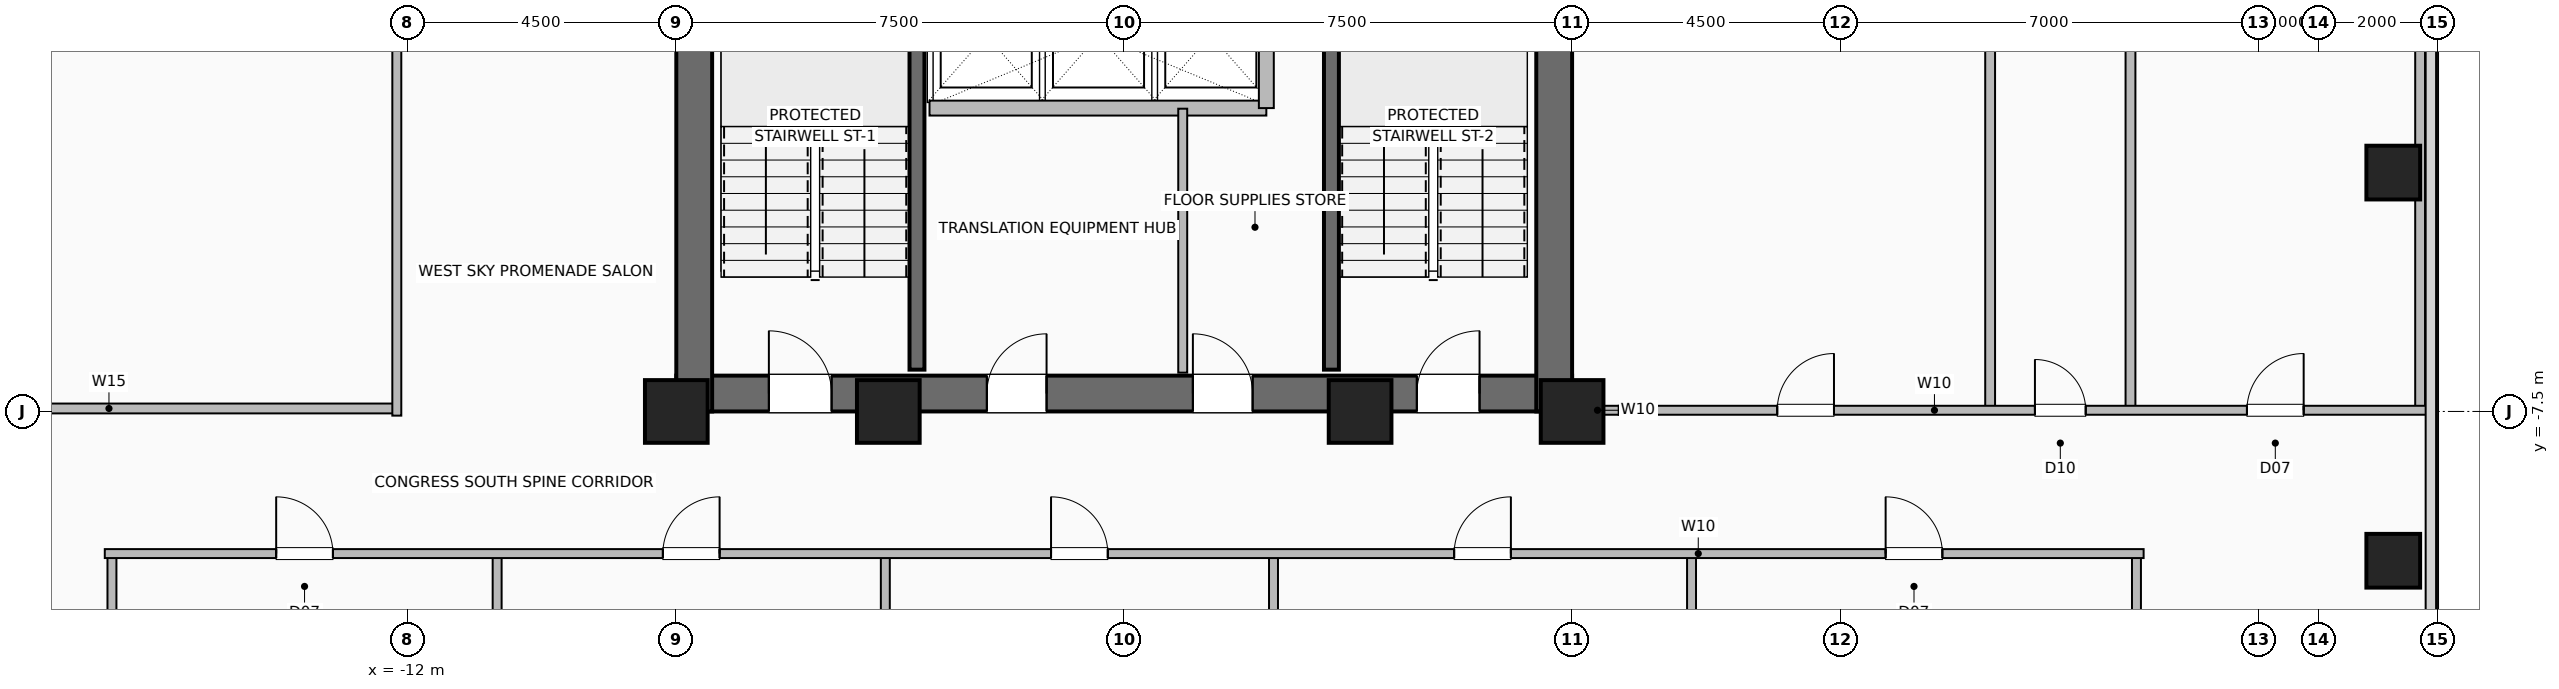
"""IFC4 building model, lengths in metres.
Left out: names, types, materials, properties, quantities, classifications, styles, units other than length and angle.
Written with IfcOpenShell. Run it as: python <this file> out.ifc"""

import sys

from ifc_helpers import new_model, si_unit, direction, frame, frame_2d, origin, origin_2d, place, context, subcontext, project, spatial, rectangle, hollow_rectangle, extrude, element, fill, save


model = new_model("IFC4")
c1 = context("Model", 3, precision=1e-05, world=origin(), true_north=direction((0.0, 1.0)))
c2 = subcontext(c1, "Body", "Model", "MODEL_VIEW")
j1 = project(units=[si_unit("LENGTHUNIT", "METRE"), si_unit("PLANEANGLEUNIT", "RADIAN")], contexts=[c1])
p1 = place(None, origin())
s1 = spatial("IfcSite", under=j1, at=p1, CompositionType="ELEMENT")
p2 = place(p1, origin())
s2 = spatial("IfcBuilding", under=s1, at=p2, CompositionType="ELEMENT")
p3 = place(p2, frame((0.0, 0.0, 108.4)))
s3 = spatial("IfcBuildingStorey", under=s2, at=p3, CompositionType="ELEMENT", Elevation=108.4)
for number, where, z_axis, x_axis in (
    (1, (-7.5, -7.5, 0.0), (0.0, 0.0, 1.0), (1.0, 0.0, 0.0)),
    (2, (-3.95, -7.5, 0.0), (0.0, 0.0, 1.0), (1.0, 0.0, 0.0)),
    (3, (3.95, -7.5, 0.0), (0.0, 0.0, 1.0), (1.0, 0.0, 0.0)),
    (4, (7.5, -7.5, 0.0), (0.0, 0.0, 1.0), (1.0, 0.0, 0.0)),
):
    element("IfcColumn", number, at=place(p3, frame(where, z_axis=z_axis, x_axis=x_axis)), inside=s3, PredefinedType="COLUMN", context=c2, shape_type="SweptSolid", body=[
        extrude(hollow_rectangle(XDim=1.05, YDim=1.05, WallThickness=0.05, at=origin_2d()), origin(), (0.0, 0.0, 1.0), 3.6),
    ])
for number, where, z_axis, x_axis in (
    (5, (21.25, -10.0, 0.0), (0.0, 0.0, 1.0), (1.0, 0.0, 0.0)),
    (6, (21.25, -3.5, 0.0), (0.0, 0.0, 1.0), (1.0, 0.0, 0.0)),
):
    element("IfcColumn", number, at=place(p3, frame(where, z_axis=z_axis, x_axis=x_axis)), inside=s3, PredefinedType="COLUMN", context=c2, shape_type="SweptSolid", body=[
        extrude(hollow_rectangle(XDim=0.9, YDim=0.9, WallThickness=0.045, at=origin_2d()), origin(), (0.0, 0.0, 1.0), 3.6),
    ])
p4 = place(p3, frame((-7.5, -7.2, 0.0), z_axis=(0.0, 0.0, 1.0), x_axis=(1.0, 0.0, 0.0)))
e7 = element("IfcWall", 7, at=p4, inside=s3, PredefinedType="SHEAR", context=c2, shape_type="SweptSolid", body=[
    extrude(rectangle(XDim=15.0, YDim=0.6, at=frame_2d((7.5, 0.0))), origin(), (0.0, 0.0, 1.0), 3.36),
])
p5 = place(p4, frame((1.55, 0.0, 0.0)))
e8 = element("IfcOpeningElement", 8, at=p5, cuts=e7, PredefinedType="OPENING", context=c2, shape_type="SweptSolid", body=[
    extrude(rectangle(XDim=1.05, YDim=2.08, at=frame_2d((0.525, 1.04))), frame((0.0, 0.31, 0.0), z_axis=(0.0, -1.0, 0.0), x_axis=(1.0, 0.0, 0.0)), (0.0, 0.0, 1.0), 0.62),
])
p6 = place(p4, frame((12.4, 0.0, 0.0)))
e9 = element("IfcOpeningElement", 9, at=p6, cuts=e7, PredefinedType="OPENING", context=c2, shape_type="SweptSolid", body=[
    extrude(rectangle(XDim=1.05, YDim=2.08, at=frame_2d((0.525, 1.04))), frame((0.0, 0.31, 0.0), z_axis=(0.0, -1.0, 0.0), x_axis=(1.0, 0.0, 0.0)), (0.0, 0.0, 1.0), 0.62),
])
p7 = place(p4, frame((5.2, 0.0, 0.0)))
e10 = element("IfcOpeningElement", 10, at=p7, cuts=e7, PredefinedType="OPENING", context=c2, shape_type="SweptSolid", body=[
    extrude(rectangle(XDim=1.0, YDim=2.08, at=frame_2d((0.5, 1.04))), frame((0.0, 0.31, 0.0), z_axis=(0.0, -1.0, 0.0), x_axis=(1.0, 0.0, 0.0)), (0.0, 0.0, 1.0), 0.62),
])
p8 = place(p4, frame((8.65, 0.0, 0.0)))
e11 = element("IfcOpeningElement", 11, at=p8, cuts=e7, PredefinedType="OPENING", context=c2, shape_type="SweptSolid", body=[
    extrude(rectangle(XDim=1.0, YDim=2.08, at=frame_2d((0.5, 1.04))), frame((0.0, 0.31, 0.0), z_axis=(0.0, -1.0, 0.0), x_axis=(1.0, 0.0, 0.0)), (0.0, 0.0, 1.0), 0.62),
])
p9 = place(p3, frame((-7.2, -7.5, 0.0), z_axis=(0.0, 0.0, 1.0), x_axis=(0.0, 1.0, 0.0)))
e12 = element("IfcWall", 12, at=p9, inside=s3, PredefinedType="SHEAR", context=c2, shape_type="SweptSolid", body=[
    extrude(rectangle(XDim=15.0, YDim=0.6, at=frame_2d((7.5, 0.0))), origin(), (0.0, 0.0, 1.0), 3.36),
])
p10 = place(p9, frame((9.5, 0.0, 0.0)))
e13 = element("IfcOpeningElement", 13, at=p10, cuts=e12, PredefinedType="OPENING", context=c2, shape_type="SweptSolid", body=[
    extrude(rectangle(XDim=1.0, YDim=2.08, at=frame_2d((0.5, 1.04))), frame((0.0, 0.31, 0.0), z_axis=(0.0, -1.0, 0.0), x_axis=(1.0, 0.0, 0.0)), (0.0, 0.0, 1.0), 0.62),
])
p11 = place(p3, frame((7.2, -7.5, 0.0), z_axis=(0.0, 0.0, 1.0), x_axis=(0.0, 1.0, 0.0)))
e14 = element("IfcWall", 14, at=p11, inside=s3, PredefinedType="SHEAR", context=c2, shape_type="SweptSolid", body=[
    extrude(rectangle(XDim=15.0, YDim=0.6, at=frame_2d((7.5, 0.0))), origin(), (0.0, 0.0, 1.0), 3.36),
])
for number, where, z_axis, x_axis in (
    (15, (-3.47, -6.8, 0.0), (0.0, 0.0, 1.0), (0.0, 1.0, 0.0)),
    (16, (3.47, -6.8, 0.0), (0.0, 0.0, 1.0), (0.0, 1.0, 0.0)),
):
    element("IfcWall", number, at=place(p3, frame(where, z_axis=z_axis, x_axis=x_axis)), inside=s3, PredefinedType="SHEAR", context=c2, shape_type="SweptSolid", body=[
        extrude(rectangle(XDim=7.72, YDim=0.25, at=frame_2d((3.86, 0.0))), origin(), (0.0, 0.0, 1.0), 3.36),
    ])
p12 = place(p3, frame((-3.26, -2.42, 0.0), z_axis=(0.0, 0.0, 1.0), x_axis=(1.0, 0.0, 0.0)))
e17 = element("IfcWall", 17, at=p12, inside=s3, PredefinedType="SHEAR", context=c2, shape_type="SweptSolid", body=[
    extrude(rectangle(XDim=5.64, YDim=0.25, at=frame_2d((2.82, 0.0))), origin(), (0.0, 0.0, 1.0), 3.36),
])
p13 = place(p3, frame((2.38, -2.42, 0.0), z_axis=(0.0, 0.0, 1.0), x_axis=(0.0, 1.0, 0.0)))
e18 = element("IfcWall", 18, at=p13, inside=s3, PredefinedType="SHEAR", context=c2, shape_type="SweptSolid", body=[
    extrude(rectangle(XDim=2.44, YDim=0.25, at=frame_2d((1.22, 0.0))), origin(), (0.0, 0.0, 1.0), 3.36),
])
p14 = place(p3, frame((0.98, -6.85, 0.0), z_axis=(0.0, 0.0, 1.0), x_axis=(0.0, 1.0, 0.0)))
e19 = element("IfcWall", 19, at=p14, inside=s3, PredefinedType="PARTITIONING", context=c2, shape_type="SweptSolid", body=[
    extrude(rectangle(XDim=4.42, YDim=0.15, at=frame_2d((2.21, 0.0))), origin(), (0.0, 0.0, 1.0), 3.36),
])
for number, where, z_axis, x_axis in (
    (20, (-16.95, -21.82, 0.0), (0.0, 0.0, 1.0), (0.0, 1.0, 0.0)),
    (21, (-10.5, -21.82, 0.0), (0.0, 0.0, 1.0), (0.0, 1.0, 0.0)),
    (22, (-4.0, -21.82, 0.0), (0.0, 0.0, 1.0), (0.0, 1.0, 0.0)),
    (23, (2.5, -21.82, 0.0), (0.0, 0.0, 1.0), (0.0, 1.0, 0.0)),
    (24, (9.5, -21.82, 0.0), (0.0, 0.0, 1.0), (0.0, 1.0, 0.0)),
    (25, (16.95, -21.82, 0.0), (0.0, 0.0, 1.0), (0.0, 1.0, 0.0)),
):
    element("IfcWall", number, at=place(p3, frame(where, z_axis=z_axis, x_axis=x_axis)), inside=s3, PredefinedType="PARTITIONING", context=c2, shape_type="SweptSolid", body=[
        extrude(rectangle(XDim=11.94, YDim=0.15, at=frame_2d((5.97, 0.0))), origin(), (0.0, 0.0, 1.0), 3.36),
    ])
p15 = place(p3, frame((-17.07, -9.88, 0.0), z_axis=(0.0, 0.0, 1.0), x_axis=(1.0, 0.0, 0.0)))
e26 = element("IfcWall", 26, at=p15, inside=s3, PredefinedType="PARTITIONING", context=c2, shape_type="SweptSolid", body=[
    extrude(rectangle(XDim=34.14, YDim=0.15, at=frame_2d((17.07, 0.0))), origin(), (0.0, 0.0, 1.0), 3.36),
])
p16 = place(p15, frame((2.87, 0.0, 0.0)))
e27 = element("IfcOpeningElement", 27, at=p16, cuts=e26, PredefinedType="OPENING", context=c2, shape_type="SweptSolid", body=[
    extrude(rectangle(XDim=0.95, YDim=2.06, at=frame_2d((0.475, 1.03))), frame((0.0, 0.085, 0.0), z_axis=(0.0, -1.0, 0.0), x_axis=(1.0, 0.0, 0.0)), (0.0, 0.0, 1.0), 0.17),
])
p17 = place(p15, frame((9.345, 0.0, 0.0)))
e28 = element("IfcOpeningElement", 28, at=p17, cuts=e26, PredefinedType="OPENING", context=c2, shape_type="SweptSolid", body=[
    extrude(rectangle(XDim=0.95, YDim=2.06, at=frame_2d((0.475, 1.03))), frame((0.0, 0.085, 0.0), z_axis=(0.0, -1.0, 0.0), x_axis=(1.0, 0.0, 0.0)), (0.0, 0.0, 1.0), 0.17),
])
p18 = place(p15, frame((15.845, 0.0, 0.0)))
e29 = element("IfcOpeningElement", 29, at=p18, cuts=e26, PredefinedType="OPENING", context=c2, shape_type="SweptSolid", body=[
    extrude(rectangle(XDim=0.95, YDim=2.06, at=frame_2d((0.475, 1.03))), frame((0.0, 0.085, 0.0), z_axis=(0.0, -1.0, 0.0), x_axis=(1.0, 0.0, 0.0)), (0.0, 0.0, 1.0), 0.17),
])
p19 = place(p15, frame((22.595, 0.0, 0.0)))
e30 = element("IfcOpeningElement", 30, at=p19, cuts=e26, PredefinedType="OPENING", context=c2, shape_type="SweptSolid", body=[
    extrude(rectangle(XDim=0.95, YDim=2.06, at=frame_2d((0.475, 1.03))), frame((0.0, 0.085, 0.0), z_axis=(0.0, -1.0, 0.0), x_axis=(1.0, 0.0, 0.0)), (0.0, 0.0, 1.0), 0.17),
])
p20 = place(p15, frame((29.82, 0.0, 0.0)))
e31 = element("IfcOpeningElement", 31, at=p20, cuts=e26, PredefinedType="OPENING", context=c2, shape_type="SweptSolid", body=[
    extrude(rectangle(XDim=0.95, YDim=2.06, at=frame_2d((0.475, 1.03))), frame((0.0, 0.085, 0.0), z_axis=(0.0, -1.0, 0.0), x_axis=(1.0, 0.0, 0.0)), (0.0, 0.0, 1.0), 0.17),
])
p21 = place(p3, frame((-21.82, -7.45, 0.0), z_axis=(0.0, 0.0, 1.0), x_axis=(1.0, 0.0, 0.0)))
e32 = element("IfcWall", 32, at=p21, inside=s3, PredefinedType="PLUMBINGWALL", context=c2, shape_type="SweptSolid", body=[
    extrude(rectangle(XDim=9.64, YDim=0.165, at=frame_2d((4.82, 0.0))), origin(), (0.0, 0.0, 1.0), 3.36),
])
p22 = place(p3, frame((-12.18, -7.57, 0.0), z_axis=(0.0, 0.0, 1.0), x_axis=(0.0, 1.0, 0.0)))
e33 = element("IfcWall", 33, at=p22, inside=s3, PredefinedType="PARTITIONING", context=c2, shape_type="SweptSolid", body=[
    extrude(rectangle(XDim=15.14, YDim=0.15, at=frame_2d((7.57, 0.0))), origin(), (0.0, 0.0, 1.0), 3.36),
])
p23 = place(p22, frame((7.095, 0.0, 0.0)))
e34 = element("IfcOpeningElement", 34, at=p23, cuts=e33, PredefinedType="OPENING", context=c2, shape_type="SweptSolid", body=[
    extrude(rectangle(XDim=0.95, YDim=2.06, at=frame_2d((0.475, 1.03))), frame((0.0, 0.085, 0.0), z_axis=(0.0, -1.0, 0.0), x_axis=(1.0, 0.0, 0.0)), (0.0, 0.0, 1.0), 0.17),
])
p24 = place(p3, frame((7.45, -7.48, 0.0), z_axis=(0.0, 0.0, 1.0), x_axis=(1.0, 0.0, 0.0)))
e35 = element("IfcWall", 35, at=p24, inside=s3, PredefinedType="PARTITIONING", context=c2, shape_type="SweptSolid", body=[
    extrude(rectangle(XDim=0.95, YDim=0.15, at=frame_2d((0.475, 0.0))), origin(), (0.0, 0.0, 1.0), 3.36),
])
for number, where, z_axis, x_axis in (
    (36, (16.85, -7.48, 0.0), (0.0, 0.0, 1.0), (0.0, 1.0, 0.0)),
    (37, (14.5, -7.48, 0.0), (0.0, 0.0, 1.0), (0.0, 1.0, 0.0)),
    (38, (21.7, -7.48, 0.0), (0.0, 0.0, 1.0), (0.0, 1.0, 0.0)),
):
    element("IfcWall", number, at=place(p3, frame(where, z_axis=z_axis, x_axis=x_axis)), inside=s3, PredefinedType="PLUMBINGWALL", context=c2, shape_type="SweptSolid", body=[
        extrude(rectangle(XDim=14.88, YDim=0.165, at=frame_2d((7.44, 0.0))), origin(), (0.0, 0.0, 1.0), 3.36),
    ])
p25 = place(p3, frame((8.28, -7.48, 0.0), z_axis=(0.0, 0.0, 1.0), x_axis=(1.0, 0.0, 0.0)))
e39 = element("IfcWall", 39, at=p25, inside=s3, PredefinedType="PARTITIONING", context=c2, shape_type="SweptSolid", body=[
    extrude(rectangle(XDim=13.54, YDim=0.15, at=frame_2d((6.77, 0.0))), origin(), (0.0, 0.0, 1.0), 3.36),
])
p26 = place(p25, frame((2.655, 0.0, 0.0)))
e40 = element("IfcOpeningElement", 40, at=p26, cuts=e39, PredefinedType="OPENING", context=c2, shape_type="SweptSolid", body=[
    extrude(rectangle(XDim=0.95, YDim=2.06, at=frame_2d((0.475, 1.03))), frame((0.0, 0.085, 0.0), z_axis=(0.0, -1.0, 0.0), x_axis=(1.0, 0.0, 0.0)), (0.0, 0.0, 1.0), 0.17),
])
p27 = place(p25, frame((6.97, 0.0, 0.0)))
e41 = element("IfcOpeningElement", 41, at=p27, cuts=e39, PredefinedType="OPENING", context=c2, shape_type="SweptSolid", body=[
    extrude(rectangle(XDim=0.85, YDim=2.05, at=frame_2d((0.425, 1.025))), frame((0.0, 0.085, 0.0), z_axis=(0.0, -1.0, 0.0), x_axis=(1.0, 0.0, 0.0)), (0.0, 0.0, 1.0), 0.17),
])
p28 = place(p25, frame((10.52, 0.0, 0.0)))
e42 = element("IfcOpeningElement", 42, at=p28, cuts=e39, PredefinedType="OPENING", context=c2, shape_type="SweptSolid", body=[
    extrude(rectangle(XDim=0.95, YDim=2.06, at=frame_2d((0.475, 1.03))), frame((0.0, 0.085, 0.0), z_axis=(0.0, -1.0, 0.0), x_axis=(1.0, 0.0, 0.0)), (0.0, 0.0, 1.0), 0.17),
])
p29 = place(p5, origin())
e43 = element("IfcDoor", 43, at=p29, inside=s3, OperationType="SINGLE_SWING_LEFT", PredefinedType="DOOR", context=c2, shape_type="SweptSolid", body=[
    extrude(rectangle(XDim=1.05, YDim=2.08, at=frame_2d((0.525, 1.04))), frame((0.0, 0.025, 0.0), z_axis=(0.0, -1.0, 0.0), x_axis=(1.0, 0.0, 0.0)), (0.0, 0.0, 1.0), 0.05),
])
fill(e8, e43)
p30 = place(p6, origin())
e44 = element("IfcDoor", 44, at=p30, inside=s3, OperationType="SINGLE_SWING_RIGHT", PredefinedType="DOOR", context=c2, shape_type="SweptSolid", body=[
    extrude(rectangle(XDim=1.05, YDim=2.08, at=frame_2d((0.525, 1.04))), frame((0.0, 0.025, 0.0), z_axis=(0.0, -1.0, 0.0), x_axis=(1.0, 0.0, 0.0)), (0.0, 0.0, 1.0), 0.05),
])
fill(e9, e44)
p31 = place(p7, origin())
e45 = element("IfcDoor", 45, at=p31, inside=s3, OperationType="SINGLE_SWING_RIGHT", PredefinedType="DOOR", context=c2, shape_type="SweptSolid", body=[
    extrude(rectangle(XDim=1.0, YDim=2.08, at=frame_2d((0.5, 1.04))), frame((0.0, 0.025, 0.0), z_axis=(0.0, -1.0, 0.0), x_axis=(1.0, 0.0, 0.0)), (0.0, 0.0, 1.0), 0.05),
])
fill(e10, e45)
p32 = place(p8, origin())
e46 = element("IfcDoor", 46, at=p32, inside=s3, OperationType="SINGLE_SWING_LEFT", PredefinedType="DOOR", context=c2, shape_type="SweptSolid", body=[
    extrude(rectangle(XDim=1.0, YDim=2.08, at=frame_2d((0.5, 1.04))), frame((0.0, 0.025, 0.0), z_axis=(0.0, -1.0, 0.0), x_axis=(1.0, 0.0, 0.0)), (0.0, 0.0, 1.0), 0.05),
])
fill(e11, e46)
p33 = place(p16, origin())
e47 = element("IfcDoor", 47, at=p33, inside=s3, OperationType="SINGLE_SWING_LEFT", PredefinedType="DOOR", context=c2, shape_type="SweptSolid", body=[
    extrude(rectangle(XDim=0.95, YDim=2.06, at=frame_2d((0.475, 1.03))), frame((0.0, 0.025, 0.0), z_axis=(0.0, -1.0, 0.0), x_axis=(1.0, 0.0, 0.0)), (0.0, 0.0, 1.0), 0.05),
])
fill(e27, e47)
p34 = place(p17, origin())
e48 = element("IfcDoor", 48, at=p34, inside=s3, OperationType="SINGLE_SWING_RIGHT", PredefinedType="DOOR", context=c2, shape_type="SweptSolid", body=[
    extrude(rectangle(XDim=0.95, YDim=2.06, at=frame_2d((0.475, 1.03))), frame((0.0, 0.025, 0.0), z_axis=(0.0, -1.0, 0.0), x_axis=(1.0, 0.0, 0.0)), (0.0, 0.0, 1.0), 0.05),
])
fill(e28, e48)
p35 = place(p18, origin())
e49 = element("IfcDoor", 49, at=p35, inside=s3, OperationType="SINGLE_SWING_LEFT", PredefinedType="DOOR", context=c2, shape_type="SweptSolid", body=[
    extrude(rectangle(XDim=0.95, YDim=2.06, at=frame_2d((0.475, 1.03))), frame((0.0, 0.025, 0.0), z_axis=(0.0, -1.0, 0.0), x_axis=(1.0, 0.0, 0.0)), (0.0, 0.0, 1.0), 0.05),
])
fill(e29, e49)
p36 = place(p19, origin())
e50 = element("IfcDoor", 50, at=p36, inside=s3, OperationType="SINGLE_SWING_RIGHT", PredefinedType="DOOR", context=c2, shape_type="SweptSolid", body=[
    extrude(rectangle(XDim=0.95, YDim=2.06, at=frame_2d((0.475, 1.03))), frame((0.0, 0.025, 0.0), z_axis=(0.0, -1.0, 0.0), x_axis=(1.0, 0.0, 0.0)), (0.0, 0.0, 1.0), 0.05),
])
fill(e30, e50)
p37 = place(p20, origin())
e51 = element("IfcDoor", 51, at=p37, inside=s3, OperationType="SINGLE_SWING_LEFT", PredefinedType="DOOR", context=c2, shape_type="SweptSolid", body=[
    extrude(rectangle(XDim=0.95, YDim=2.06, at=frame_2d((0.475, 1.03))), frame((0.0, 0.025, 0.0), z_axis=(0.0, -1.0, 0.0), x_axis=(1.0, 0.0, 0.0)), (0.0, 0.0, 1.0), 0.05),
])
fill(e31, e51)
p38 = place(p26, origin())
e52 = element("IfcDoor", 52, at=p38, inside=s3, OperationType="SINGLE_SWING_RIGHT", PredefinedType="DOOR", context=c2, shape_type="SweptSolid", body=[
    extrude(rectangle(XDim=0.95, YDim=2.06, at=frame_2d((0.475, 1.03))), frame((0.0, 0.025, 0.0), z_axis=(0.0, -1.0, 0.0), x_axis=(1.0, 0.0, 0.0)), (0.0, 0.0, 1.0), 0.05),
])
fill(e40, e52)
p39 = place(p27, origin())
e53 = element("IfcDoor", 53, at=p39, inside=s3, OperationType="SINGLE_SWING_LEFT", PredefinedType="DOOR", context=c2, shape_type="SweptSolid", body=[
    extrude(rectangle(XDim=0.85, YDim=2.05, at=frame_2d((0.425, 1.025))), frame((0.0, 0.025, 0.0), z_axis=(0.0, -1.0, 0.0), x_axis=(1.0, 0.0, 0.0)), (0.0, 0.0, 1.0), 0.05),
])
fill(e41, e53)
p40 = place(p28, origin())
e54 = element("IfcDoor", 54, at=p40, inside=s3, OperationType="SINGLE_SWING_RIGHT", PredefinedType="DOOR", context=c2, shape_type="SweptSolid", body=[
    extrude(rectangle(XDim=0.95, YDim=2.06, at=frame_2d((0.475, 1.03))), frame((0.0, 0.025, 0.0), z_axis=(0.0, -1.0, 0.0), x_axis=(1.0, 0.0, 0.0)), (0.0, 0.0, 1.0), 0.05),
])
fill(e42, e54)
save(model, sys.argv[1])
